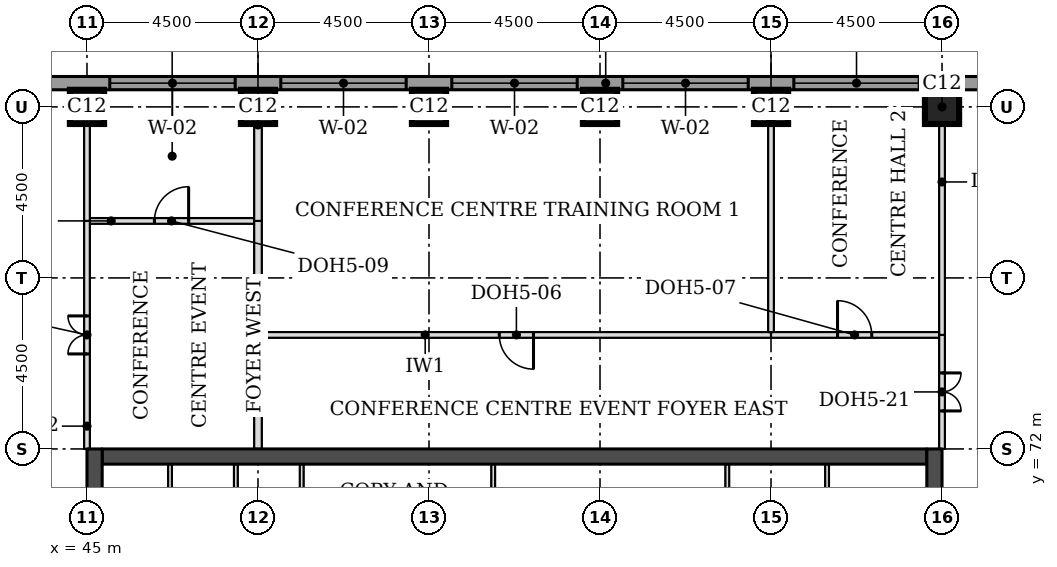
"""IFC4 building model, lengths in metres.
Left out: names, types, materials, properties, quantities, classifications, styles, units other than length and angle.
Written with IfcOpenShell. Run it as: python <this file> out.ifc"""

import sys

from ifc_helpers import new_model, si_unit, direction, frame, frame_2d, origin, origin_2d, place, context, subcontext, project, spatial, rectangle, extrude, element, fill, save


model = new_model("IFC4")
c1 = context("Model", 3, precision=1e-05, world=origin(), true_north=direction((0.0, 1.0)))
c2 = subcontext(c1, "Body", "Model", "MODEL_VIEW")
j1 = project(units=[si_unit("LENGTHUNIT", "METRE"), si_unit("PLANEANGLEUNIT", "RADIAN")], contexts=[c1])
p1 = place(None, origin())
s1 = spatial("IfcSite", under=j1, at=p1, CompositionType="ELEMENT")
p2 = place(p1, origin())
s2 = spatial("IfcBuilding", under=s1, at=p2, CompositionType="ELEMENT")
p3 = place(p2, frame((0.0, 0.0, 177.3)))
s3 = spatial("IfcBuildingStorey", under=s2, at=p3, CompositionType="ELEMENT", Elevation=177.3)
for number, where, z_axis, x_axis in (
    (1, (45.0, 81.0, 0.0), (0.0, 0.0, 1.0), (1.0, 0.0, 0.0)),
    (2, (49.5, 81.0, 0.0), (0.0, 0.0, 1.0), (1.0, 0.0, 0.0)),
    (3, (54.0, 81.0, 0.0), (0.0, 0.0, 1.0), (1.0, 0.0, 0.0)),
    (4, (58.5, 81.0, 0.0), (0.0, 0.0, 1.0), (1.0, 0.0, 0.0)),
    (5, (63.0, 81.0, 0.0), (0.0, 0.0, 1.0), (1.0, 0.0, 0.0)),
    (6, (67.5, 81.0, 0.0), (0.0, 0.0, 1.0), (1.0, 0.0, 0.0)),
):
    element("IfcColumn", number, at=place(p3, frame(where, z_axis=z_axis, x_axis=x_axis)), inside=s3, PredefinedType="COLUMN", context=c2, shape_type="SweptSolid", body=[
        extrude(rectangle(XDim=0.9, YDim=0.9, at=origin_2d()), origin(), (0.0, 0.0, 1.0), 3.7),
    ])
p4 = place(p3, frame((45.4, 71.8, 0.0), z_axis=(0.0, 0.0, 1.0), x_axis=(1.0, 0.0, 0.0)))
e7 = element("IfcWall", 7, at=p4, inside=s3, PredefinedType="SHEAR", context=c2, shape_type="SweptSolid", body=[
    extrude(rectangle(XDim=21.7, YDim=0.4, at=frame_2d((10.85, 0.0))), origin(), (0.0, 0.0, 1.0), 3.7),
])
p5 = place(p3, frame((45.2, 49.5, 0.0), z_axis=(0.0, 0.0, 1.0), x_axis=(0.0, 1.0, 0.0)))
e8 = element("IfcWall", 8, at=p5, inside=s3, PredefinedType="SHEAR", context=c2, shape_type="SweptSolid", body=[
    extrude(rectangle(XDim=22.5, YDim=0.4, at=frame_2d((11.25, 0.0))), origin(), (0.0, 0.0, 1.0), 3.7),
])
p6 = place(p5, frame((4.2, 0.0, 0.0)))
e9 = element("IfcOpeningElement", 9, at=p6, cuts=e8, PredefinedType="OPENING", context=c2, shape_type="SweptSolid", body=[
    extrude(rectangle(XDim=1.8, YDim=2.1, at=frame_2d((0.9, 1.05))), frame((0.0, 0.21, 0.0), z_axis=(0.0, -1.0, 0.0), x_axis=(1.0, 0.0, 0.0)), (0.0, 0.0, 1.0), 0.42),
])
p7 = place(p5, frame((6.9, 0.0, 0.0)))
e10 = element("IfcOpeningElement", 10, at=p7, cuts=e8, PredefinedType="OPENING", context=c2, shape_type="SweptSolid", body=[
    extrude(rectangle(XDim=1.1, YDim=2.1, at=frame_2d((0.55, 1.05))), frame((0.0, 0.21, 0.0), z_axis=(0.0, -1.0, 0.0), x_axis=(1.0, 0.0, 0.0)), (0.0, 0.0, 1.0), 0.42),
])
p8 = place(p5, frame((13.6, 0.0, 0.0)))
e11 = element("IfcOpeningElement", 11, at=p8, cuts=e8, PredefinedType="OPENING", context=c2, shape_type="SweptSolid", body=[
    extrude(rectangle(XDim=1.1, YDim=2.1, at=frame_2d((0.55, 1.05))), frame((0.0, 0.21, 0.0), z_axis=(0.0, -1.0, 0.0), x_axis=(1.0, 0.0, 0.0)), (0.0, 0.0, 1.0), 0.42),
])
p9 = place(p5, frame((16.5, 0.0, 0.0)))
e12 = element("IfcOpeningElement", 12, at=p9, cuts=e8, PredefinedType="OPENING", context=c2, shape_type="SweptSolid", body=[
    extrude(rectangle(XDim=1.8, YDim=2.1, at=frame_2d((0.9, 1.05))), frame((0.0, 0.21, 0.0), z_axis=(0.0, -1.0, 0.0), x_axis=(1.0, 0.0, 0.0)), (0.0, 0.0, 1.0), 0.42),
])
p10 = place(p3, frame((67.3, 49.5, 0.0), z_axis=(0.0, 0.0, 1.0), x_axis=(0.0, 1.0, 0.0)))
e13 = element("IfcWall", 13, at=p10, inside=s3, PredefinedType="SHEAR", context=c2, shape_type="SweptSolid", body=[
    extrude(rectangle(XDim=22.5, YDim=0.4, at=frame_2d((11.25, 0.0))), origin(), (0.0, 0.0, 1.0), 3.7),
])
p11 = place(p10, frame((4.2, 0.0, 0.0)))
e14 = element("IfcOpeningElement", 14, at=p11, cuts=e13, PredefinedType="OPENING", context=c2, shape_type="SweptSolid", body=[
    extrude(rectangle(XDim=1.8, YDim=2.1, at=frame_2d((0.9, 1.05))), frame((0.0, 0.21, 0.0), z_axis=(0.0, -1.0, 0.0), x_axis=(1.0, 0.0, 0.0)), (0.0, 0.0, 1.0), 0.42),
])
p12 = place(p10, frame((6.9, 0.0, 0.0)))
e15 = element("IfcOpeningElement", 15, at=p12, cuts=e13, PredefinedType="OPENING", context=c2, shape_type="SweptSolid", body=[
    extrude(rectangle(XDim=1.1, YDim=2.1, at=frame_2d((0.55, 1.05))), frame((0.0, 0.21, 0.0), z_axis=(0.0, -1.0, 0.0), x_axis=(1.0, 0.0, 0.0)), (0.0, 0.0, 1.0), 0.42),
])
p13 = place(p10, frame((13.6, 0.0, 0.0)))
e16 = element("IfcOpeningElement", 16, at=p13, cuts=e13, PredefinedType="OPENING", context=c2, shape_type="SweptSolid", body=[
    extrude(rectangle(XDim=1.1, YDim=2.1, at=frame_2d((0.55, 1.05))), frame((0.0, 0.21, 0.0), z_axis=(0.0, -1.0, 0.0), x_axis=(1.0, 0.0, 0.0)), (0.0, 0.0, 1.0), 0.42),
])
p14 = place(p10, frame((16.5, 0.0, 0.0)))
e17 = element("IfcOpeningElement", 17, at=p14, cuts=e13, PredefinedType="OPENING", context=c2, shape_type="SweptSolid", body=[
    extrude(rectangle(XDim=1.8, YDim=2.1, at=frame_2d((0.9, 1.05))), frame((0.0, 0.21, 0.0), z_axis=(0.0, -1.0, 0.0), x_axis=(1.0, 0.0, 0.0)), (0.0, 0.0, 1.0), 0.42),
])
p15 = place(p3, frame((72.331, 81.625, 0.0), z_axis=(0.0, 0.0, 1.0), x_axis=(-1.0, 0.0, 0.0)))
e18 = element("IfcWall", 18, at=p15, inside=s3, PredefinedType="STANDARD", context=c2, shape_type="SweptSolid", body=[
    extrude(rectangle(XDim=32.163, YDim=0.35, at=frame_2d((16.081, 0.0))), origin(), (0.0, 0.0, 1.0), 3.525),
])
p16 = place(p15, frame((5.431, 0.0, 0.9)))
e19 = element("IfcOpeningElement", 19, at=p16, cuts=e18, PredefinedType="OPENING", context=c2, shape_type="SweptSolid", body=[
    extrude(rectangle(XDim=3.3, YDim=1.9, at=frame_2d((1.65, 0.95))), frame((0.0, 0.185, 0.0), z_axis=(0.0, -1.0, 0.0), x_axis=(1.0, 0.0, 0.0)), (0.0, 0.0, 1.0), 0.37),
])
p17 = place(p15, frame((9.931, 0.0, 0.9)))
e20 = element("IfcOpeningElement", 20, at=p17, cuts=e18, PredefinedType="OPENING", context=c2, shape_type="SweptSolid", body=[
    extrude(rectangle(XDim=3.3, YDim=1.9, at=frame_2d((1.65, 0.95))), frame((0.0, 0.185, 0.0), z_axis=(0.0, -1.0, 0.0), x_axis=(1.0, 0.0, 0.0)), (0.0, 0.0, 1.0), 0.37),
])
p18 = place(p15, frame((14.431, 0.0, 0.9)))
e21 = element("IfcOpeningElement", 21, at=p18, cuts=e18, PredefinedType="OPENING", context=c2, shape_type="SweptSolid", body=[
    extrude(rectangle(XDim=3.3, YDim=1.9, at=frame_2d((1.65, 0.95))), frame((0.0, 0.185, 0.0), z_axis=(0.0, -1.0, 0.0), x_axis=(1.0, 0.0, 0.0)), (0.0, 0.0, 1.0), 0.37),
])
p19 = place(p15, frame((18.931, 0.0, 0.9)))
e22 = element("IfcOpeningElement", 22, at=p19, cuts=e18, PredefinedType="OPENING", context=c2, shape_type="SweptSolid", body=[
    extrude(rectangle(XDim=3.3, YDim=1.9, at=frame_2d((1.65, 0.95))), frame((0.0, 0.185, 0.0), z_axis=(0.0, -1.0, 0.0), x_axis=(1.0, 0.0, 0.0)), (0.0, 0.0, 1.0), 0.37),
])
p20 = place(p15, frame((23.431, 0.0, 0.9)))
e23 = element("IfcOpeningElement", 23, at=p20, cuts=e18, PredefinedType="OPENING", context=c2, shape_type="SweptSolid", body=[
    extrude(rectangle(XDim=3.3, YDim=1.9, at=frame_2d((1.65, 0.95))), frame((0.0, 0.185, 0.0), z_axis=(0.0, -1.0, 0.0), x_axis=(1.0, 0.0, 0.0)), (0.0, 0.0, 1.0), 0.37),
])
p21 = place(p3, frame((49.6, 75.0, 0.0), z_axis=(0.0, 0.0, 1.0), x_axis=(1.0, 0.0, 0.0)))
e24 = element("IfcWall", 24, at=p21, inside=s3, PredefinedType="PARTITIONING", context=c2, shape_type="SweptSolid", body=[
    extrude(rectangle(XDim=13.4, YDim=0.15, at=frame_2d((6.7, 0.0))), origin(), (0.0, 0.0, 1.0), 3.55),
])
p22 = place(p21, frame((6.25, 0.0, 0.0)))
e25 = element("IfcOpeningElement", 25, at=p22, cuts=e24, PredefinedType="OPENING", context=c2, shape_type="SweptSolid", body=[
    extrude(rectangle(XDim=0.9, YDim=2.1, at=frame_2d((0.45, 1.05))), frame((0.0, 0.085, 0.0), z_axis=(0.0, -1.0, 0.0), x_axis=(1.0, 0.0, 0.0)), (0.0, 0.0, 1.0), 0.17),
])
p23 = place(p3, frame((63.0, 75.0, 0.0), z_axis=(0.0, 0.0, 1.0), x_axis=(1.0, 0.0, 0.0)))
e26 = element("IfcWall", 26, at=p23, inside=s3, PredefinedType="PARTITIONING", context=c2, shape_type="SweptSolid", body=[
    extrude(rectangle(XDim=4.425, YDim=0.15, at=frame_2d((2.212, 0.0))), origin(), (0.0, 0.0, 1.0), 3.55),
])
p24 = place(p23, frame((1.75, 0.0, 0.0)))
e27 = element("IfcOpeningElement", 27, at=p24, cuts=e26, PredefinedType="OPENING", context=c2, shape_type="SweptSolid", body=[
    extrude(rectangle(XDim=0.9, YDim=2.1, at=frame_2d((0.45, 1.05))), frame((0.0, 0.085, 0.0), z_axis=(0.0, -1.0, 0.0), x_axis=(1.0, 0.0, 0.0)), (0.0, 0.0, 1.0), 0.17),
])
p25 = place(p3, frame((45.075, 78.0, 0.0), z_axis=(0.0, 0.0, 1.0), x_axis=(1.0, 0.0, 0.0)))
e28 = element("IfcWall", 28, at=p25, inside=s3, PredefinedType="PARTITIONING", context=c2, shape_type="SweptSolid", body=[
    extrude(rectangle(XDim=4.325, YDim=0.15, at=frame_2d((2.163, 0.0))), origin(), (0.0, 0.0, 1.0), 3.55),
])
p26 = place(p25, frame((1.7, 0.0, 0.0)))
e29 = element("IfcOpeningElement", 29, at=p26, cuts=e28, PredefinedType="OPENING", context=c2, shape_type="SweptSolid", body=[
    extrude(rectangle(XDim=0.9, YDim=2.1, at=frame_2d((0.45, 1.05))), frame((0.0, 0.085, 0.0), z_axis=(0.0, -1.0, 0.0), x_axis=(1.0, 0.0, 0.0)), (0.0, 0.0, 1.0), 0.17),
])
p27 = place(p3, frame((45.0, 72.0, 0.0), z_axis=(0.0, 0.0, 1.0), x_axis=(0.0, 1.0, 0.0)))
e30 = element("IfcWall", 30, at=p27, inside=s3, PredefinedType="PARTITIONING", context=c2, shape_type="SweptSolid", body=[
    extrude(rectangle(XDim=6.0, YDim=0.15, at=frame_2d((3.0, 0.0))), origin(), (0.0, 0.0, 1.0), 3.022),
])
p28 = place(p27, frame((2.5, 0.0, 0.0)))
e31 = element("IfcOpeningElement", 31, at=p28, cuts=e30, PredefinedType="OPENING", context=c2, shape_type="SweptSolid", body=[
    extrude(rectangle(XDim=1.0, YDim=2.1, at=frame_2d((0.5, 1.05))), frame((0.0, 0.085, 0.0), z_axis=(0.0, -1.0, 0.0), x_axis=(1.0, 0.0, 0.0)), (0.0, 0.0, 1.0), 0.17),
])
p29 = place(p3, frame((49.5, 72.0, 0.0), z_axis=(0.0, 0.0, 1.0), x_axis=(0.0, 1.0, 0.0)))
e32 = element("IfcWall", 32, at=p29, inside=s3, PredefinedType="PARTITIONING", context=c2, shape_type="SweptSolid", body=[
    extrude(rectangle(XDim=3.0, YDim=0.2, at=frame_2d((1.5, 0.0))), origin(), (0.0, 0.0, 1.0), 3.55),
])
p30 = place(p3, frame((67.5, 72.0, 0.0), z_axis=(0.0, 0.0, 1.0), x_axis=(0.0, 1.0, 0.0)))
e33 = element("IfcWall", 33, at=p30, inside=s3, PredefinedType="PARTITIONING", context=c2, shape_type="SweptSolid", body=[
    extrude(rectangle(XDim=3.0, YDim=0.15, at=frame_2d((1.5, 0.0))), origin(), (0.0, 0.0, 1.0), 3.022),
])
p31 = place(p30, frame((1.0, 0.0, 0.0)))
e34 = element("IfcOpeningElement", 34, at=p31, cuts=e33, PredefinedType="OPENING", context=c2, shape_type="SweptSolid", body=[
    extrude(rectangle(XDim=1.0, YDim=2.1, at=frame_2d((0.5, 1.05))), frame((0.0, 0.085, 0.0), z_axis=(0.0, -1.0, 0.0), x_axis=(1.0, 0.0, 0.0)), (0.0, 0.0, 1.0), 0.17),
])
p32 = place(p3, frame((49.5, 75.0, 0.0), z_axis=(0.0, 0.0, 1.0), x_axis=(0.0, 1.0, 0.0)))
e35 = element("IfcWall", 35, at=p32, inside=s3, PredefinedType="PARTITIONING", context=c2, shape_type="SweptSolid", body=[
    extrude(rectangle(XDim=3.0, YDim=0.2, at=frame_2d((1.5, 0.0))), origin(), (0.0, 0.0, 1.0), 3.55),
])
p33 = place(p3, frame((67.5, 75.0, 0.0), z_axis=(0.0, 0.0, 1.0), x_axis=(0.0, 1.0, 0.0)))
e36 = element("IfcWall", 36, at=p33, inside=s3, PredefinedType="PARTITIONING", context=c2, shape_type="SweptSolid", body=[
    extrude(rectangle(XDim=6.45, YDim=0.15, at=frame_2d((3.225, 0.0))), origin(), (0.0, 0.0, 1.0), 3.022),
])
p34 = place(p3, frame((63.0, 75.075, 0.0), z_axis=(0.0, 0.0, 1.0), x_axis=(0.0, 1.0, 0.0)))
e37 = element("IfcWall", 37, at=p34, inside=s3, PredefinedType="PARTITIONING", context=c2, shape_type="SweptSolid", body=[
    extrude(rectangle(XDim=6.375, YDim=0.15, at=frame_2d((3.188, 0.0))), origin(), (0.0, 0.0, 1.0), 3.55),
])
p35 = place(p3, frame((45.0, 78.0, 0.0), z_axis=(0.0, 0.0, 1.0), x_axis=(0.0, 1.0, 0.0)))
e38 = element("IfcWall", 38, at=p35, inside=s3, PredefinedType="PARTITIONING", context=c2, shape_type="SweptSolid", body=[
    extrude(rectangle(XDim=3.45, YDim=0.15, at=frame_2d((1.725, 0.0))), origin(), (0.0, 0.0, 1.0), 3.022),
])
p36 = place(p3, frame((49.5, 78.0, 0.0), z_axis=(0.0, 0.0, 1.0), x_axis=(0.0, 1.0, 0.0)))
e39 = element("IfcWall", 39, at=p36, inside=s3, PredefinedType="PARTITIONING", context=c2, shape_type="SweptSolid", body=[
    extrude(rectangle(XDim=3.45, YDim=0.2, at=frame_2d((1.725, 0.0))), origin(), (0.0, 0.0, 1.0), 3.55),
])
for number, where, z_axis, x_axis in (
    (40, (47.185, 68.5, 0.0), (0.0, 0.0, 1.0), (0.0, 1.0, 0.0)),
    (41, (48.917, 68.5, 0.0), (0.0, 0.0, 1.0), (0.0, 1.0, 0.0)),
    (42, (50.65, 68.5, 0.0), (0.0, 0.0, 1.0), (0.0, 1.0, 0.0)),
    (43, (55.69, 68.5, 0.0), (0.0, 0.0, 1.0), (0.0, 1.0, 0.0)),
    (44, (61.85, 68.5, 0.0), (0.0, 0.0, 1.0), (0.0, 1.0, 0.0)),
    (45, (64.475, 68.5, 0.0), (0.0, 0.0, 1.0), (0.0, 1.0, 0.0)),
):
    element("IfcWall", number, at=place(p3, frame(where, z_axis=z_axis, x_axis=x_axis)), inside=s3, PredefinedType="PARTITIONING", context=c2, shape_type="SweptSolid", body=[
        extrude(rectangle(XDim=3.1, YDim=0.1, at=frame_2d((1.55, 0.0))), origin(), (0.0, 0.0, 1.0), 3.55),
    ])
p37 = place(p16, origin())
e46 = element("IfcWindow", 46, at=p37, inside=s3, PartitioningType="SINGLE_PANEL", PredefinedType="WINDOW", context=c2, shape_type="SweptSolid", body=[
    extrude(rectangle(XDim=3.3, YDim=1.9, at=frame_2d((1.65, 0.95))), frame((0.0, 0.085, 0.0), z_axis=(0.0, -1.0, 0.0), x_axis=(1.0, 0.0, 0.0)), (0.0, 0.0, 1.0), 0.06),
])
fill(e19, e46)
p38 = place(p17, origin())
e47 = element("IfcWindow", 47, at=p38, inside=s3, PartitioningType="SINGLE_PANEL", PredefinedType="WINDOW", context=c2, shape_type="SweptSolid", body=[
    extrude(rectangle(XDim=3.3, YDim=1.9, at=frame_2d((1.65, 0.95))), frame((0.0, 0.085, 0.0), z_axis=(0.0, -1.0, 0.0), x_axis=(1.0, 0.0, 0.0)), (0.0, 0.0, 1.0), 0.06),
])
fill(e20, e47)
p39 = place(p18, origin())
e48 = element("IfcWindow", 48, at=p39, inside=s3, PartitioningType="SINGLE_PANEL", PredefinedType="WINDOW", context=c2, shape_type="SweptSolid", body=[
    extrude(rectangle(XDim=3.3, YDim=1.9, at=frame_2d((1.65, 0.95))), frame((0.0, 0.085, 0.0), z_axis=(0.0, -1.0, 0.0), x_axis=(1.0, 0.0, 0.0)), (0.0, 0.0, 1.0), 0.06),
])
fill(e21, e48)
p40 = place(p19, origin())
e49 = element("IfcWindow", 49, at=p40, inside=s3, PartitioningType="SINGLE_PANEL", PredefinedType="WINDOW", context=c2, shape_type="SweptSolid", body=[
    extrude(rectangle(XDim=3.3, YDim=1.9, at=frame_2d((1.65, 0.95))), frame((0.0, 0.085, 0.0), z_axis=(0.0, -1.0, 0.0), x_axis=(1.0, 0.0, 0.0)), (0.0, 0.0, 1.0), 0.06),
])
fill(e22, e49)
p41 = place(p20, origin())
e50 = element("IfcWindow", 50, at=p41, inside=s3, PartitioningType="SINGLE_PANEL", PredefinedType="WINDOW", context=c2, shape_type="SweptSolid", body=[
    extrude(rectangle(XDim=3.3, YDim=1.9, at=frame_2d((1.65, 0.95))), frame((0.0, 0.085, 0.0), z_axis=(0.0, -1.0, 0.0), x_axis=(1.0, 0.0, 0.0)), (0.0, 0.0, 1.0), 0.06),
])
fill(e23, e50)
p42 = place(p28, origin())
e51 = element("IfcDoor", 51, at=p42, inside=s3, OperationType="DOUBLE_DOOR_SINGLE_SWING", PredefinedType="DOOR", context=c2, shape_type="SweptSolid", body=[
    extrude(rectangle(XDim=1.0, YDim=2.1, at=frame_2d((0.5, 1.05))), frame((0.0, 0.025, 0.0), z_axis=(0.0, -1.0, 0.0), x_axis=(1.0, 0.0, 0.0)), (0.0, 0.0, 1.0), 0.05),
])
fill(e31, e51)
p43 = place(p26, origin())
e52 = element("IfcDoor", 52, at=p43, inside=s3, OperationType="SINGLE_SWING_RIGHT", PredefinedType="DOOR", context=c2, shape_type="SweptSolid", body=[
    extrude(rectangle(XDim=0.9, YDim=2.1, at=frame_2d((0.45, 1.05))), frame((0.0, 0.025, 0.0), z_axis=(0.0, -1.0, 0.0), x_axis=(1.0, 0.0, 0.0)), (0.0, 0.0, 1.0), 0.05),
])
fill(e29, e52)
p44 = place(p31, frame((1.0, 0.0, 0.0), z_axis=(0.0, 0.0, 1.0), x_axis=(-1.0, 0.0, 0.0)))
e53 = element("IfcDoor", 53, at=p44, inside=s3, OperationType="DOUBLE_DOOR_SINGLE_SWING", PredefinedType="DOOR", context=c2, shape_type="SweptSolid", body=[
    extrude(rectangle(XDim=1.0, YDim=2.1, at=frame_2d((0.5, 1.05))), frame((0.0, 0.025, 0.0), z_axis=(0.0, -1.0, 0.0), x_axis=(1.0, 0.0, 0.0)), (0.0, 0.0, 1.0), 0.05),
])
fill(e34, e53)
p45 = place(p22, frame((0.9, 0.0, 0.0), z_axis=(0.0, 0.0, 1.0), x_axis=(-1.0, 0.0, 0.0)))
e54 = element("IfcDoor", 54, at=p45, inside=s3, OperationType="SINGLE_SWING_LEFT", PredefinedType="DOOR", context=c2, shape_type="SweptSolid", body=[
    extrude(rectangle(XDim=0.9, YDim=2.1, at=frame_2d((0.45, 1.05))), frame((0.0, 0.025, 0.0), z_axis=(0.0, -1.0, 0.0), x_axis=(1.0, 0.0, 0.0)), (0.0, 0.0, 1.0), 0.05),
])
fill(e25, e54)
p46 = place(p24, origin())
e55 = element("IfcDoor", 55, at=p46, inside=s3, OperationType="SINGLE_SWING_LEFT", PredefinedType="DOOR", context=c2, shape_type="SweptSolid", body=[
    extrude(rectangle(XDim=0.9, YDim=2.1, at=frame_2d((0.45, 1.05))), frame((0.0, 0.025, 0.0), z_axis=(0.0, -1.0, 0.0), x_axis=(1.0, 0.0, 0.0)), (0.0, 0.0, 1.0), 0.05),
])
fill(e27, e55)
save(model, sys.argv[1])
